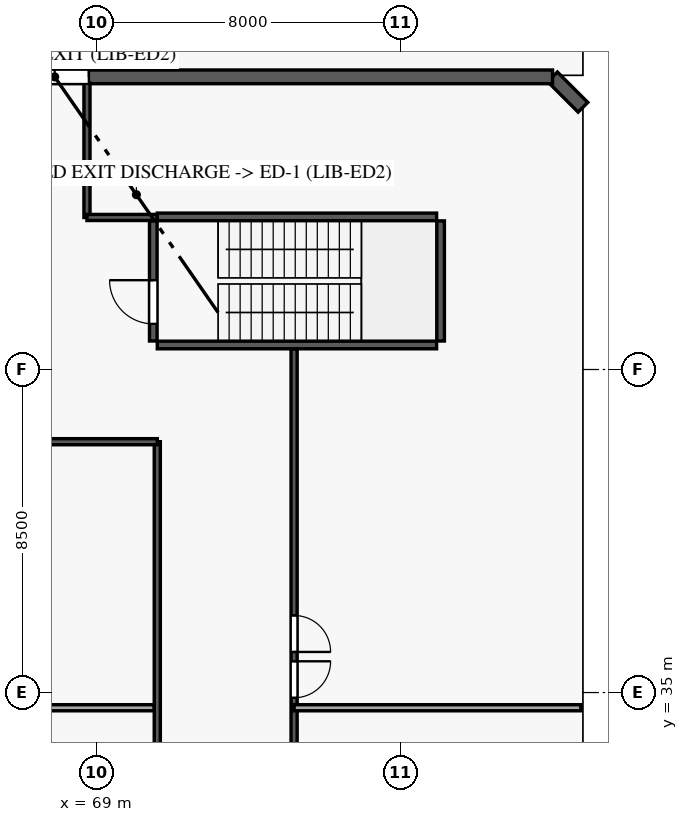
"""IFC4 building model, lengths in metres.
Left out: names, types, materials, properties, quantities, classifications, styles, units other than length and angle.
Written with IfcOpenShell. Run it as: python <this file> out.ifc"""

import sys

from ifc_helpers import new_model, si_unit, direction, frame, frame_2d, origin, origin_with_axes, origin_2d, place, context, subcontext, project, spatial, rectangle, circle, extrude, source, transform, mapped, element, fill, save


model = new_model("IFC4")
c1 = context("Model", 3, precision=1e-05, world=origin(), true_north=direction((0.0, 1.0)))
c2 = subcontext(c1, "Body", "Model", "MODEL_VIEW")
j1 = project(units=[si_unit("LENGTHUNIT", "METRE"), si_unit("PLANEANGLEUNIT", "RADIAN")], contexts=[c1])
p1 = place(None, origin())
s1 = spatial("IfcSite", under=j1, at=p1, CompositionType="ELEMENT")
p2 = place(p1, origin())
s2 = spatial("IfcBuilding", under=s1, at=p2, CompositionType="ELEMENT")
p3 = place(p2, origin())
s3 = spatial("IfcBuildingStorey", under=s2, at=p3, CompositionType="ELEMENT", Elevation=0.0)
m1 = source(origin_with_axes(), c2, "Body", "SweptSolid", [
    extrude(circle(Radius=0.375, at=origin_2d()), origin(), (0.0, 0.0, 1.0), 4.5),
])
for number, where, z_axis, x_axis in (
    (1, (69.6, 49.95, 0.0), (0.0, 0.0, 1.0), (1.0, 0.0, 0.0)),
    (2, (75.4, 49.95, 0.0), (0.0, 0.0, 1.0), (1.0, 0.0, 0.0)),
    (3, (81.2, 49.95, 0.0), (0.0, 0.0, 1.0), (1.0, 0.0, 0.0)),
    (4, (69.6, 33.8, 0.0), (0.0, 0.0, 1.0), (1.0, 0.0, 0.0)),
    (5, (69.6, 41.0, 0.0), (0.0, 0.0, 1.0), (1.0, 0.0, 0.0)),
    (6, (69.6, 48.2, 0.0), (0.0, 0.0, 1.0), (1.0, 0.0, 0.0)),
):
    element("IfcColumn", number, at=place(p3, frame(where, z_axis=z_axis, x_axis=x_axis)), inside=s3, PredefinedType="COLUMN", context=c2, shape_type="MappedRepresentation", body=[
        mapped(m1, transform((0.0, 0.0, 0.0), scale=1.0)),
    ])
m2 = source(origin_with_axes(), c2, "Body", "SweptSolid", [
    extrude(circle(Radius=0.425, at=origin_2d()), origin(), (0.0, 0.0, 1.0), 4.5),
])
for number, where, z_axis, x_axis in (
    (7, (75.4, 33.8, 0.0), (0.0, 0.0, 1.0), (1.0, 0.0, 0.0)),
    (8, (75.4, 41.0, 0.0), (0.0, 0.0, 1.0), (1.0, 0.0, 0.0)),
    (9, (75.4, 48.2, 0.0), (0.0, 0.0, 1.0), (1.0, 0.0, 0.0)),
):
    element("IfcColumn", number, at=place(p3, frame(where, z_axis=z_axis, x_axis=x_axis)), inside=s3, PredefinedType="COLUMN", context=c2, shape_type="MappedRepresentation", body=[
        mapped(m2, transform((0.0, 0.0, 0.0), scale=1.0)),
    ])
for number, where, z_axis, x_axis in (
    (10, (81.2, 33.8, 0.0), (0.0, 0.0, 1.0), (1.0, 0.0, 0.0)),
    (11, (81.2, 41.0, 0.0), (0.0, 0.0, 1.0), (1.0, 0.0, 0.0)),
    (12, (81.2, 48.2, 0.0), (0.0, 0.0, 1.0), (1.0, 0.0, 0.0)),
):
    element("IfcColumn", number, at=place(p3, frame(where, z_axis=z_axis, x_axis=x_axis)), inside=s3, PredefinedType="COLUMN", context=c2, shape_type="MappedRepresentation", body=[
        mapped(m1, transform((0.0, 0.0, 0.0), scale=1.0)),
    ])
m3 = source(origin_with_axes(), c2, "Body", "SweptSolid", [
    extrude(rectangle(XDim=0.5, YDim=0.75, at=origin_2d()), origin(), (0.0, 0.0, 1.0), 4.5),
])
p4 = place(p3, frame((72.5, 41.0, 0.0), z_axis=(0.0, 0.0, 1.0), x_axis=(1.0, 0.0, 0.0)))
e13 = element("IfcColumn", 13, at=p4, inside=s3, PredefinedType="PILASTER", context=c2, shape_type="MappedRepresentation", body=[
    mapped(m3, transform((0.0, 0.0, 0.0), scale=1.0)),
])
p5 = place(p3, frame((81.8, 50.4, 0.0), z_axis=(0.0, 0.0, 1.0), x_axis=(-0.707106781187, 0.707106781187, 0.0)))
e14 = element("IfcWall", 14, at=p5, inside=s3, PredefinedType="SOLIDWALL", context=c2, shape_type="SweptSolid", body=[
    extrude(rectangle(XDim=1.131, YDim=0.36, at=frame_2d((0.566, 0.0))), origin(), (0.0, 0.0, 1.0), 4.2),
])
p6 = place(p3, frame((66.2, 51.2, 0.0), z_axis=(0.0, 0.0, 1.0), x_axis=(1.0, 0.0, 0.0)))
e15 = element("IfcWall", 15, at=p6, inside=s3, PredefinedType="SOLIDWALL", context=c2, shape_type="SweptSolid", body=[
    extrude(rectangle(XDim=14.8, YDim=0.36, at=frame_2d((7.4, 0.0))), origin(), (0.0, 0.0, 1.0), 4.2),
])
p7 = place(p6, frame((10.605, 0.0, 0.85)))
e16 = element("IfcOpeningElement", 16, at=p7, cuts=e15, PredefinedType="OPENING", context=c2, shape_type="SweptSolid", body=[
    extrude(rectangle(XDim=1.6, YDim=2.2, at=frame_2d((0.8, 1.1))), frame((0.0, 0.19, 0.0), z_axis=(0.0, -1.0, 0.0), x_axis=(1.0, 0.0, 0.0)), (0.0, 0.0, 1.0), 0.38),
])
p8 = place(p6, frame((4.915, 0.0, 0.85)))
e17 = element("IfcOpeningElement", 17, at=p8, cuts=e15, PredefinedType="OPENING", context=c2, shape_type="SweptSolid", body=[
    extrude(rectangle(XDim=1.6, YDim=2.2, at=frame_2d((0.8, 1.1))), frame((0.0, 0.19, 0.0), z_axis=(0.0, -1.0, 0.0), x_axis=(1.0, 0.0, 0.0)), (0.0, 0.0, 1.0), 0.38),
])
p9 = place(p6, frame((0.8, 0.0, 0.0)))
e18 = element("IfcOpeningElement", 18, at=p9, cuts=e15, PredefinedType="OPENING", context=c2, shape_type="SweptSolid", body=[
    extrude(rectangle(XDim=1.8, YDim=2.3, at=frame_2d((0.9, 1.15))), frame((0.0, 0.19, 0.0), z_axis=(0.0, -1.0, 0.0), x_axis=(1.0, 0.0, 0.0)), (0.0, 0.0, 1.0), 0.38),
])
for number, where, z_axis, x_axis in (
    (19, (70.6, 44.145, 0.0), (0.0, 0.0, 1.0), (1.0, 0.0, 0.0)),
    (20, (70.6, 47.515, 0.0), (0.0, 0.0, 1.0), (1.0, 0.0, 0.0)),
):
    element("IfcWall", number, at=place(p3, frame(where, z_axis=z_axis, x_axis=x_axis)), inside=s3, PredefinedType="SHEAR", context=c2, shape_type="SweptSolid", body=[
        extrude(rectangle(XDim=7.35, YDim=0.2, at=frame_2d((3.675, 0.0))), origin(), (0.0, 0.0, 1.0), 4.2),
    ])
p10 = place(p3, frame((70.495, 44.25, 0.0), z_axis=(0.0, 0.0, 1.0), x_axis=(0.0, 1.0, 0.0)))
e21 = element("IfcWall", 21, at=p10, inside=s3, PredefinedType="SHEAR", context=c2, shape_type="SweptSolid", body=[
    extrude(rectangle(XDim=3.16, YDim=0.2, at=frame_2d((1.58, 0.0))), origin(), (0.0, 0.0, 1.0), 4.2),
])
p11 = place(p10, frame((0.45, 0.0, 0.0)))
e22 = element("IfcOpeningElement", 22, at=p11, cuts=e21, PredefinedType="OPENING", context=c2, shape_type="SweptSolid", body=[
    extrude(rectangle(XDim=1.15, YDim=2.15, at=frame_2d((0.575, 1.075))), frame((0.0, 0.11, 0.0), z_axis=(0.0, -1.0, 0.0), x_axis=(1.0, 0.0, 0.0)), (0.0, 0.0, 1.0), 0.22),
])
p12 = place(p3, frame((78.055, 44.25, 0.0), z_axis=(0.0, 0.0, 1.0), x_axis=(0.0, 1.0, 0.0)))
e23 = element("IfcWall", 23, at=p12, inside=s3, PredefinedType="SHEAR", context=c2, shape_type="SweptSolid", body=[
    extrude(rectangle(XDim=3.16, YDim=0.2, at=frame_2d((1.58, 0.0))), origin(), (0.0, 0.0, 1.0), 4.2),
])
p13 = place(p3, frame((70.6, 11.4, 0.0), z_axis=(0.0, 0.0, 1.0), x_axis=(0.0, 1.0, 0.0)))
e24 = element("IfcWall", 24, at=p13, inside=s3, PredefinedType="PARTITIONING", context=c2, shape_type="SweptSolid", body=[
    extrude(rectangle(XDim=30.2, YDim=0.16, at=frame_2d((15.1, 0.0))), origin(), (0.0, 0.0, 1.0), 4.2),
])
p14 = place(p3, frame((74.2, 44.038, 0.0), z_axis=(0.0, 0.0, 1.0), x_axis=(0.0, -1.0, 0.0)))
e25 = element("IfcWall", 25, at=p14, inside=s3, PredefinedType="PARTITIONING", context=c2, shape_type="SweptSolid", body=[
    extrude(rectangle(XDim=15.138, YDim=0.16, at=frame_2d((7.569, 0.0))), origin(), (0.0, 0.0, 1.0), 4.2),
])
p15 = place(p14, frame((8.216, 0.0, 0.0)))
e26 = element("IfcOpeningElement", 26, at=p15, cuts=e25, PredefinedType="OPENING", context=c2, shape_type="SweptSolid", body=[
    extrude(rectangle(XDim=0.96, YDim=2.15, at=frame_2d((0.48, 1.075))), frame((0.0, 0.09, 0.0), z_axis=(0.0, -1.0, 0.0), x_axis=(1.0, 0.0, 0.0)), (0.0, 0.0, 1.0), 0.18),
])
p16 = place(p14, frame((7.01, 0.0, 0.0)))
e27 = element("IfcOpeningElement", 27, at=p16, cuts=e25, PredefinedType="OPENING", context=c2, shape_type="SweptSolid", body=[
    extrude(rectangle(XDim=0.96, YDim=2.15, at=frame_2d((0.48, 1.075))), frame((0.0, 0.09, 0.0), z_axis=(0.0, -1.0, 0.0), x_axis=(1.0, 0.0, 0.0)), (0.0, 0.0, 1.0), 0.18),
])
p17 = place(p14, frame((11.658, 0.0, 0.0)))
e28 = element("IfcOpeningElement", 28, at=p17, cuts=e25, PredefinedType="OPENING", context=c2, shape_type="SweptSolid", body=[
    extrude(rectangle(XDim=0.86, YDim=2.04, at=frame_2d((0.43, 1.02))), frame((0.0, 0.09, 0.0), z_axis=(0.0, -1.0, 0.0), x_axis=(1.0, 0.0, 0.0)), (0.0, 0.0, 1.0), 0.18),
])
p18 = place(p3, frame((74.2, 34.6, 0.0), z_axis=(0.0, 0.0, 1.0), x_axis=(1.0, 0.0, 0.0)))
e29 = element("IfcWall", 29, at=p18, inside=s3, PredefinedType="PARTITIONING", context=c2, shape_type="SweptSolid", body=[
    extrude(rectangle(XDim=7.545, YDim=0.16, at=frame_2d((3.772, 0.0))), origin(), (0.0, 0.0, 1.0), 4.2),
])
p19 = place(p3, frame((65.455, 34.6, 0.0), z_axis=(0.0, 0.0, 1.0), x_axis=(1.0, 0.0, 0.0)))
e30 = element("IfcWall", 30, at=p19, inside=s3, PredefinedType="PARTITIONING", context=c2, shape_type="SweptSolid", body=[
    extrude(rectangle(XDim=5.06, YDim=0.16, at=frame_2d((2.53, 0.0))), origin(), (0.0, 0.0, 1.0), 4.2),
])
p20 = place(p3, frame((70.6, 41.6, 0.0), z_axis=(0.0, 0.0, 1.0), x_axis=(-1.0, 0.0, 0.0)))
e31 = element("IfcWall", 31, at=p20, inside=s3, PredefinedType="PARTITIONING", context=c2, shape_type="SweptSolid", body=[
    extrude(rectangle(XDim=4.05, YDim=0.16, at=frame_2d((2.025, 0.0))), origin(), (0.0, 0.0, 1.0), 3.55),
])
p21 = place(p3, frame((68.75, 51.035, 0.0), z_axis=(0.0, 0.0, 1.0), x_axis=(0.0, -1.0, 0.0)))
e32 = element("IfcWall", 32, at=p21, inside=s3, PredefinedType="PARTITIONING", context=c2, shape_type="SweptSolid", body=[
    extrude(rectangle(XDim=3.535, YDim=0.16, at=frame_2d((1.768, 0.0))), origin(), (0.0, 0.0, 1.0), 4.2),
])
p22 = place(p3, frame((68.75, 47.5, 0.0), z_axis=(0.0, 0.0, 1.0), x_axis=(1.0, 0.0, 0.0)))
e33 = element("IfcWall", 33, at=p22, inside=s3, PredefinedType="PARTITIONING", context=c2, shape_type="SweptSolid", body=[
    extrude(rectangle(XDim=1.845, YDim=0.16, at=frame_2d((0.922, 0.0))), origin(), (0.0, 0.0, 1.0), 4.2),
])
m4 = source(origin_with_axes(), c2, "Body", "SweptSolid", [
    extrude(rectangle(XDim=1.6, YDim=2.2, at=frame_2d((0.8, 1.1))), frame((0.0, 0.03, 0.0), z_axis=(0.0, -1.0, 0.0), x_axis=(1.0, 0.0, 0.0)), (0.0, 0.0, 1.0), 0.06),
])
p23 = place(p7, origin())
e34 = element("IfcWindow", 34, at=p23, inside=s3, PartitioningType="SINGLE_PANEL", PredefinedType="WINDOW", context=c2, shape_type="MappedRepresentation", body=[
    mapped(m4, transform((0.0, 0.0, 0.0), scale=1.0)),
])
fill(e16, e34)
p24 = place(p8, origin())
e35 = element("IfcWindow", 35, at=p24, inside=s3, PartitioningType="SINGLE_PANEL", PredefinedType="WINDOW", context=c2, shape_type="MappedRepresentation", body=[
    mapped(m4, transform((0.0, 0.0, 0.0), scale=1.0)),
])
fill(e17, e35)
m5 = source(origin_with_axes(), c2, "Body", "SweptSolid", [
    extrude(rectangle(XDim=1.8, YDim=2.3, at=frame_2d((0.9, 1.15))), frame((0.0, 0.025, 0.0), z_axis=(0.0, -1.0, 0.0), x_axis=(1.0, 0.0, 0.0)), (0.0, 0.0, 1.0), 0.05),
])
p25 = place(p9, origin())
e36 = element("IfcDoor", 36, at=p25, inside=s3, OperationType="DOUBLE_DOOR_SINGLE_SWING", PredefinedType="DOOR", context=c2, shape_type="MappedRepresentation", body=[
    mapped(m5, transform((0.0, 0.0, 0.0), scale=1.0)),
])
fill(e18, e36)
m6 = source(origin_with_axes(), c2, "Body", "SweptSolid", [
    extrude(rectangle(XDim=1.15, YDim=2.15, at=frame_2d((0.575, 1.075))), frame((0.0, 0.025, 0.0), z_axis=(0.0, -1.0, 0.0), x_axis=(1.0, 0.0, 0.0)), (0.0, 0.0, 1.0), 0.05),
])
p26 = place(p11, origin())
e37 = element("IfcDoor", 37, at=p26, inside=s3, OperationType="SINGLE_SWING_RIGHT", PredefinedType="DOOR", context=c2, shape_type="MappedRepresentation", body=[
    mapped(m6, transform((0.0, 0.0, 0.0), scale=1.0)),
])
fill(e22, e37)
m7 = source(origin_with_axes(), c2, "Body", "SweptSolid", [
    extrude(rectangle(XDim=0.96, YDim=2.15, at=frame_2d((0.48, 1.075))), frame((0.0, 0.025, 0.0), z_axis=(0.0, -1.0, 0.0), x_axis=(1.0, 0.0, 0.0)), (0.0, 0.0, 1.0), 0.05),
])
p27 = place(p15, origin())
e38 = element("IfcDoor", 38, at=p27, inside=s3, OperationType="SINGLE_SWING_LEFT", PredefinedType="DOOR", context=c2, shape_type="MappedRepresentation", body=[
    mapped(m7, transform((0.0, 0.0, 0.0), scale=1.0)),
])
fill(e26, e38)
p28 = place(p16, origin())
e39 = element("IfcDoor", 39, at=p28, inside=s3, OperationType="SINGLE_SWING_RIGHT", PredefinedType="DOOR", context=c2, shape_type="MappedRepresentation", body=[
    mapped(m7, transform((0.0, 0.0, 0.0), scale=1.0)),
])
fill(e27, e39)
save(model, sys.argv[1])
